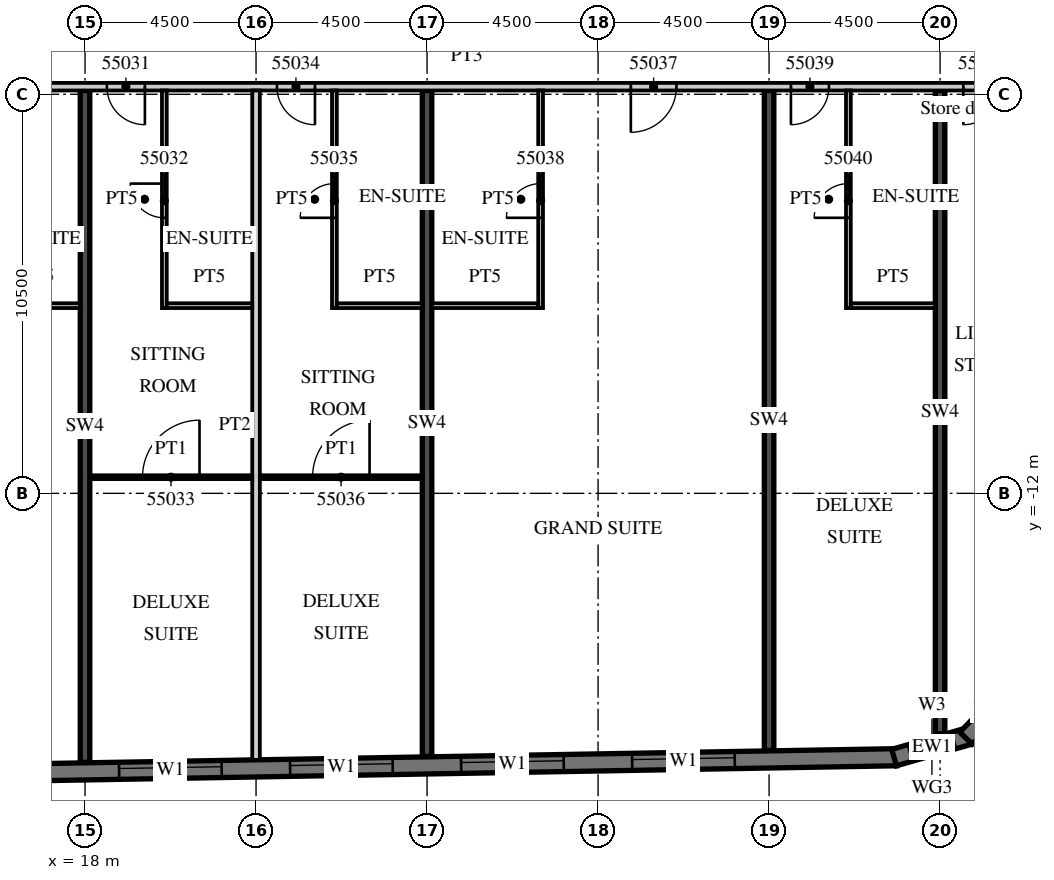
"""IFC4 building model, lengths in metres.
Left out: names, types, materials, properties, quantities, classifications, styles, units other than length and angle.
Written with IfcOpenShell. Run it as: python <this file> out.ifc"""

import sys

from ifc_helpers import new_model, si_unit, direction, frame, frame_2d, origin, place, context, subcontext, project, spatial, polyline, rectangle, outline, extrude, element, fill, save


model = new_model("IFC4")
c1 = context("Model", 3, precision=1e-05, world=origin(), true_north=direction((0.0, 1.0)))
c2 = subcontext(c1, "Body", "Model", "MODEL_VIEW")
j1 = project(units=[si_unit("LENGTHUNIT", "METRE"), si_unit("PLANEANGLEUNIT", "RADIAN")], contexts=[c1])
p1 = place(None, origin())
s1 = spatial("IfcSite", under=j1, at=p1, CompositionType="ELEMENT")
p2 = place(p1, origin())
s2 = spatial("IfcBuilding", under=s1, at=p2, CompositionType="ELEMENT")
p3 = place(p2, frame((0.0, 0.0, 227.6)))
s3 = spatial("IfcBuildingStorey", under=s2, at=p3, CompositionType="ELEMENT", Elevation=227.6)
p4 = place(p3, frame((18.0, -19.079, 0.0), z_axis=(0.0, 0.0, 1.0), x_axis=(0.0, 1.0, 0.0)))
e1 = element("IfcWall", 1, at=p4, inside=s3, PredefinedType="SHEAR", context=c2, shape_type="SweptSolid", body=[
    extrude(rectangle(XDim=17.679, YDim=0.25, at=frame_2d((8.84, 0.0))), origin(), (0.0, 0.0, 1.0), 3.3),
])
p5 = place(p3, frame((27.0, -18.922, 0.0), z_axis=(0.0, 0.0, 1.0), x_axis=(0.0, 1.0, 0.0)))
e2 = element("IfcWall", 2, at=p5, inside=s3, PredefinedType="SHEAR", context=c2, shape_type="SweptSolid", body=[
    extrude(rectangle(XDim=17.522, YDim=0.25, at=frame_2d((8.761, 0.0))), origin(), (0.0, 0.0, 1.0), 3.3),
])
p6 = place(p3, frame((36.0, -18.765, 0.0), z_axis=(0.0, 0.0, 1.0), x_axis=(0.0, 1.0, 0.0)))
e3 = element("IfcWall", 3, at=p6, inside=s3, PredefinedType="SHEAR", context=c2, shape_type="SweptSolid", body=[
    extrude(rectangle(XDim=17.365, YDim=0.25, at=frame_2d((8.683, 0.0))), origin(), (0.0, 0.0, 1.0), 3.3),
])
p7 = place(p3, frame((40.5, -18.325, 0.0), z_axis=(0.0, 0.0, 1.0), x_axis=(0.0, 1.0, 0.0)))
e4 = element("IfcWall", 4, at=p7, inside=s3, PredefinedType="SHEAR", context=c2, shape_type="SweptSolid", body=[
    extrude(rectangle(XDim=16.925, YDim=0.25, at=frame_2d((8.463, 0.0))), origin(), (0.0, 0.0, 1.0), 3.3),
])
p8 = place(p3, frame((-13.504, -19.866, 0.0), z_axis=(0.0, 0.0, 1.0), x_axis=(0.999847672978, 0.017453676992, 0.0)))
e5 = element("IfcWall", 5, at=p8, inside=s3, PredefinedType="SOLIDWALL", context=c2, shape_type="SweptSolid", body=[
    extrude(rectangle(XDim=52.86, YDim=0.45, at=frame_2d((26.43, 0.0))), origin(), (0.0, 0.0, 1.0), 3.02),
])
p9 = place(p8, frame((0.9, 0.0, 0.45)))
e6 = element("IfcOpeningElement", 6, at=p9, cuts=e5, PredefinedType="OPENING", context=c2, shape_type="SweptSolid", body=[
    extrude(rectangle(XDim=2.7, YDim=2.25, at=frame_2d((1.35, 1.125))), frame((0.0, 0.235, 0.0), z_axis=(0.0, -1.0, 0.0), x_axis=(1.0, 0.0, 0.0)), (0.0, 0.0, 1.0), 0.47),
])
p10 = place(p8, frame((5.401, 0.0, 0.45)))
e7 = element("IfcOpeningElement", 7, at=p10, cuts=e5, PredefinedType="OPENING", context=c2, shape_type="SweptSolid", body=[
    extrude(rectangle(XDim=2.7, YDim=2.25, at=frame_2d((1.35, 1.125))), frame((0.0, 0.235, 0.0), z_axis=(0.0, -1.0, 0.0), x_axis=(1.0, 0.0, 0.0)), (0.0, 0.0, 1.0), 0.47),
])
p11 = place(p8, frame((9.902, 0.0, 0.45)))
e8 = element("IfcOpeningElement", 8, at=p11, cuts=e5, PredefinedType="OPENING", context=c2, shape_type="SweptSolid", body=[
    extrude(rectangle(XDim=2.7, YDim=2.25, at=frame_2d((1.35, 1.125))), frame((0.0, 0.235, 0.0), z_axis=(0.0, -1.0, 0.0), x_axis=(1.0, 0.0, 0.0)), (0.0, 0.0, 1.0), 0.47),
])
p12 = place(p8, frame((14.402, 0.0, 0.45)))
e9 = element("IfcOpeningElement", 9, at=p12, cuts=e5, PredefinedType="OPENING", context=c2, shape_type="SweptSolid", body=[
    extrude(rectangle(XDim=2.7, YDim=2.25, at=frame_2d((1.35, 1.125))), frame((0.0, 0.235, 0.0), z_axis=(0.0, -1.0, 0.0), x_axis=(1.0, 0.0, 0.0)), (0.0, 0.0, 1.0), 0.47),
])
p13 = place(p8, frame((18.903, 0.0, 0.45)))
e10 = element("IfcOpeningElement", 10, at=p13, cuts=e5, PredefinedType="OPENING", context=c2, shape_type="SweptSolid", body=[
    extrude(rectangle(XDim=2.7, YDim=2.25, at=frame_2d((1.35, 1.125))), frame((0.0, 0.235, 0.0), z_axis=(0.0, -1.0, 0.0), x_axis=(1.0, 0.0, 0.0)), (0.0, 0.0, 1.0), 0.47),
])
p14 = place(p8, frame((23.404, 0.0, 0.45)))
e11 = element("IfcOpeningElement", 11, at=p14, cuts=e5, PredefinedType="OPENING", context=c2, shape_type="SweptSolid", body=[
    extrude(rectangle(XDim=2.7, YDim=2.25, at=frame_2d((1.35, 1.125))), frame((0.0, 0.235, 0.0), z_axis=(0.0, -1.0, 0.0), x_axis=(1.0, 0.0, 0.0)), (0.0, 0.0, 1.0), 0.47),
])
p15 = place(p8, frame((27.904, 0.0, 0.45)))
e12 = element("IfcOpeningElement", 12, at=p15, cuts=e5, PredefinedType="OPENING", context=c2, shape_type="SweptSolid", body=[
    extrude(rectangle(XDim=2.7, YDim=2.25, at=frame_2d((1.35, 1.125))), frame((0.0, 0.235, 0.0), z_axis=(0.0, -1.0, 0.0), x_axis=(1.0, 0.0, 0.0)), (0.0, 0.0, 1.0), 0.47),
])
p16 = place(p8, frame((32.405, 0.0, 0.45)))
e13 = element("IfcOpeningElement", 13, at=p16, cuts=e5, PredefinedType="OPENING", context=c2, shape_type="SweptSolid", body=[
    extrude(rectangle(XDim=2.7, YDim=2.25, at=frame_2d((1.35, 1.125))), frame((0.0, 0.235, 0.0), z_axis=(0.0, -1.0, 0.0), x_axis=(1.0, 0.0, 0.0)), (0.0, 0.0, 1.0), 0.47),
])
p17 = place(p8, frame((36.906, 0.0, 0.45)))
e14 = element("IfcOpeningElement", 14, at=p17, cuts=e5, PredefinedType="OPENING", context=c2, shape_type="SweptSolid", body=[
    extrude(rectangle(XDim=2.7, YDim=2.25, at=frame_2d((1.35, 1.125))), frame((0.0, 0.235, 0.0), z_axis=(0.0, -1.0, 0.0), x_axis=(1.0, 0.0, 0.0)), (0.0, 0.0, 1.0), 0.47),
])
p18 = place(p8, frame((41.406, 0.0, 0.45)))
e15 = element("IfcOpeningElement", 15, at=p18, cuts=e5, PredefinedType="OPENING", context=c2, shape_type="SweptSolid", body=[
    extrude(rectangle(XDim=2.7, YDim=2.25, at=frame_2d((1.35, 1.125))), frame((0.0, 0.235, 0.0), z_axis=(0.0, -1.0, 0.0), x_axis=(1.0, 0.0, 0.0)), (0.0, 0.0, 1.0), 0.47),
])
p19 = place(p8, frame((45.907, 0.0, 0.45)))
e16 = element("IfcOpeningElement", 16, at=p19, cuts=e5, PredefinedType="OPENING", context=c2, shape_type="SweptSolid", body=[
    extrude(rectangle(XDim=2.7, YDim=2.25, at=frame_2d((1.35, 1.125))), frame((0.0, 0.235, 0.0), z_axis=(0.0, -1.0, 0.0), x_axis=(1.0, 0.0, 0.0)), (0.0, 0.0, 1.0), 0.47),
])
p20 = place(p3, frame((39.29, -18.952, 0.0), z_axis=(0.0, 0.0, 1.0), x_axis=(0.961247584925, 0.275686562016, 0.0)))
e17 = element("IfcWall", 17, at=p20, inside=s3, PredefinedType="SOLIDWALL", context=c2, shape_type="SweptSolid", body=[
    extrude(outline(polyline([(0.0, -0.225), (2.071, -0.225), (1.95, 0.225), (0.121, 0.225), (0.0, -0.225)])), origin(), (0.0, 0.0, 1.0), 3.02),
])
p21 = place(p20, frame((0.435, 0.0, 0.45)))
e18 = element("IfcOpeningElement", 18, at=p21, cuts=e17, PredefinedType="OPENING", context=c2, shape_type="SweptSolid", body=[
    extrude(rectangle(XDim=1.2, YDim=2.25, at=frame_2d((0.6, 1.125))), frame((0.0, 0.235, 0.0), z_axis=(0.0, -1.0, 0.0), x_axis=(1.0, 0.0, 0.0)), (0.0, 0.0, 1.0), 0.47),
])
p22 = place(p3, frame((41.181, -18.442, 0.0), z_axis=(0.0, 0.0, 1.0), x_axis=(0.694678672846, 0.719320193998, 0.0)))
e19 = element("IfcWall", 19, at=p22, inside=s3, PredefinedType="SOLIDWALL", context=c2, shape_type="SweptSolid", body=[
    extrude(outline(polyline([(0.0, -0.225), (2.071, -0.225), (1.95, 0.225), (0.121, 0.225), (0.0, -0.225)])), origin(), (0.0, 0.0, 1.0), 3.02),
])
p23 = place(p3, frame((13.5, -1.3, 0.0), z_axis=(0.0, 0.0, 1.0), x_axis=(1.0, 0.0, 0.0)))
e20 = element("IfcWall", 20, at=p23, inside=s3, PredefinedType="PARTITIONING", context=c2, shape_type="SweptSolid", body=[
    extrude(rectangle(XDim=29.091, YDim=0.2, at=frame_2d((14.545, 0.0))), origin(), (0.0, 0.0, 1.0), 3.02),
])
p24 = place(p23, frame((0.575, 0.0, 0.0)))
e21 = element("IfcOpeningElement", 21, at=p24, cuts=e20, PredefinedType="OPENING", context=c2, shape_type="SweptSolid", body=[
    extrude(rectangle(XDim=1.0, YDim=2.1, at=frame_2d((0.5, 1.05))), frame((0.0, 0.11, 0.0), z_axis=(0.0, -1.0, 0.0), x_axis=(1.0, 0.0, 0.0)), (0.0, 0.0, 1.0), 0.22),
])
p25 = place(p23, frame((5.075, 0.0, 0.0)))
e22 = element("IfcOpeningElement", 22, at=p25, cuts=e20, PredefinedType="OPENING", context=c2, shape_type="SweptSolid", body=[
    extrude(rectangle(XDim=1.0, YDim=2.1, at=frame_2d((0.5, 1.05))), frame((0.0, 0.11, 0.0), z_axis=(0.0, -1.0, 0.0), x_axis=(1.0, 0.0, 0.0)), (0.0, 0.0, 1.0), 0.22),
])
p26 = place(p23, frame((9.55, 0.0, 0.0)))
e23 = element("IfcOpeningElement", 23, at=p26, cuts=e20, PredefinedType="OPENING", context=c2, shape_type="SweptSolid", body=[
    extrude(rectangle(XDim=1.0, YDim=2.1, at=frame_2d((0.5, 1.05))), frame((0.0, 0.11, 0.0), z_axis=(0.0, -1.0, 0.0), x_axis=(1.0, 0.0, 0.0)), (0.0, 0.0, 1.0), 0.22),
])
p27 = place(p23, frame((18.862, 0.0, 0.0)))
e24 = element("IfcOpeningElement", 24, at=p27, cuts=e20, PredefinedType="OPENING", context=c2, shape_type="SweptSolid", body=[
    extrude(rectangle(XDim=1.2, YDim=2.1, at=frame_2d((0.6, 1.05))), frame((0.0, 0.11, 0.0), z_axis=(0.0, -1.0, 0.0), x_axis=(1.0, 0.0, 0.0)), (0.0, 0.0, 1.0), 0.22),
])
p28 = place(p23, frame((23.075, 0.0, 0.0)))
e25 = element("IfcOpeningElement", 25, at=p28, cuts=e20, PredefinedType="OPENING", context=c2, shape_type="SweptSolid", body=[
    extrude(rectangle(XDim=1.0, YDim=2.1, at=frame_2d((0.5, 1.05))), frame((0.0, 0.11, 0.0), z_axis=(0.0, -1.0, 0.0), x_axis=(1.0, 0.0, 0.0)), (0.0, 0.0, 1.0), 0.22),
])
p29 = place(p23, frame((27.611, 0.0, 0.0)))
e26 = element("IfcOpeningElement", 26, at=p29, cuts=e20, PredefinedType="OPENING", context=c2, shape_type="SweptSolid", body=[
    extrude(rectangle(XDim=1.0, YDim=2.4, at=frame_2d((0.5, 1.2))), frame((0.0, 0.11, 0.0), z_axis=(0.0, -1.0, 0.0), x_axis=(1.0, 0.0, 0.0)), (0.0, 0.0, 1.0), 0.22),
])
p30 = place(p3, frame((15.625, -7.062, 0.0), z_axis=(0.0, 0.0, 1.0), x_axis=(1.0, 0.0, 0.0)))
e27 = element("IfcWall", 27, at=p30, inside=s3, PredefinedType="PARTITIONING", context=c2, shape_type="SweptSolid", body=[
    extrude(rectangle(XDim=2.25, YDim=0.125, at=frame_2d((1.125, 0.0))), origin(), (0.0, 0.0, 1.0), 3.02),
])
p31 = place(p3, frame((22.5, -19.013, 0.0), z_axis=(0.0, 0.0, 1.0), x_axis=(0.0, 1.0, 0.0)))
e28 = element("IfcWall", 28, at=p31, inside=s3, PredefinedType="PARTITIONING", context=c2, shape_type="SweptSolid", body=[
    extrude(rectangle(XDim=17.613, YDim=0.2, at=frame_2d((8.807, 0.0))), origin(), (0.0, 0.0, 1.0), 3.02),
])
p32 = place(p3, frame((20.087, -7.125, 0.0), z_axis=(0.0, 0.0, 1.0), x_axis=(0.0, 1.0, 0.0)))
e29 = element("IfcWall", 29, at=p32, inside=s3, PredefinedType="PARTITIONING", context=c2, shape_type="SweptSolid", body=[
    extrude(rectangle(XDim=5.725, YDim=0.125, at=frame_2d((2.863, 0.0))), origin(), (0.0, 0.0, 1.0), 3.02),
])
p33 = place(p32, frame((2.375, 0.0, 0.0)))
e30 = element("IfcOpeningElement", 30, at=p33, cuts=e29, PredefinedType="OPENING", context=c2, shape_type="SweptSolid", body=[
    extrude(rectangle(XDim=0.9, YDim=2.1, at=frame_2d((0.45, 1.05))), frame((0.0, 0.073, 0.0), z_axis=(0.0, -1.0, 0.0), x_axis=(1.0, 0.0, 0.0)), (0.0, 0.0, 1.0), 0.145),
])
p34 = place(p3, frame((20.15, -7.062, 0.0), z_axis=(0.0, 0.0, 1.0), x_axis=(1.0, 0.0, 0.0)))
e31 = element("IfcWall", 31, at=p34, inside=s3, PredefinedType="PARTITIONING", context=c2, shape_type="SweptSolid", body=[
    extrude(rectangle(XDim=2.25, YDim=0.125, at=frame_2d((1.125, 0.0))), origin(), (0.0, 0.0, 1.0), 3.02),
])
p35 = place(p3, frame((18.125, -11.575, 0.0), z_axis=(0.0, 0.0, 1.0), x_axis=(1.0, 0.0, 0.0)))
e32 = element("IfcWall", 32, at=p35, inside=s3, PredefinedType="PARTITIONING", context=c2, shape_type="SweptSolid", body=[
    extrude(rectangle(XDim=4.275, YDim=0.1, at=frame_2d((2.137, 0.0))), origin(), (0.0, 0.0, 1.0), 3.02),
])
p36 = place(p35, frame((1.387, 0.0, 0.0)))
e33 = element("IfcOpeningElement", 33, at=p36, cuts=e32, PredefinedType="OPENING", context=c2, shape_type="SweptSolid", body=[
    extrude(rectangle(XDim=1.5, YDim=2.1, at=frame_2d((0.75, 1.05))), frame((0.0, 0.06, 0.0), z_axis=(0.0, -1.0, 0.0), x_axis=(1.0, 0.0, 0.0)), (0.0, 0.0, 1.0), 0.12),
])
p37 = place(p3, frame((24.562, -7.125, 0.0), z_axis=(0.0, 0.0, 1.0), x_axis=(0.0, 1.0, 0.0)))
e34 = element("IfcWall", 34, at=p37, inside=s3, PredefinedType="PARTITIONING", context=c2, shape_type="SweptSolid", body=[
    extrude(rectangle(XDim=5.725, YDim=0.125, at=frame_2d((2.863, 0.0))), origin(), (0.0, 0.0, 1.0), 3.02),
])
p38 = place(p37, frame((2.375, 0.0, 0.0)))
e35 = element("IfcOpeningElement", 35, at=p38, cuts=e34, PredefinedType="OPENING", context=c2, shape_type="SweptSolid", body=[
    extrude(rectangle(XDim=0.9, YDim=2.1, at=frame_2d((0.45, 1.05))), frame((0.0, 0.073, 0.0), z_axis=(0.0, -1.0, 0.0), x_axis=(1.0, 0.0, 0.0)), (0.0, 0.0, 1.0), 0.145),
])
p39 = place(p3, frame((24.625, -7.062, 0.0), z_axis=(0.0, 0.0, 1.0), x_axis=(1.0, 0.0, 0.0)))
e36 = element("IfcWall", 36, at=p39, inside=s3, PredefinedType="PARTITIONING", context=c2, shape_type="SweptSolid", body=[
    extrude(rectangle(XDim=2.25, YDim=0.125, at=frame_2d((1.125, 0.0))), origin(), (0.0, 0.0, 1.0), 3.02),
])
p40 = place(p3, frame((22.6, -11.575, 0.0), z_axis=(0.0, 0.0, 1.0), x_axis=(1.0, 0.0, 0.0)))
e37 = element("IfcWall", 37, at=p40, inside=s3, PredefinedType="PARTITIONING", context=c2, shape_type="SweptSolid", body=[
    extrude(rectangle(XDim=4.275, YDim=0.1, at=frame_2d((2.137, 0.0))), origin(), (0.0, 0.0, 1.0), 3.02),
])
p41 = place(p40, frame((1.387, 0.0, 0.0)))
e38 = element("IfcOpeningElement", 38, at=p41, cuts=e37, PredefinedType="OPENING", context=c2, shape_type="SweptSolid", body=[
    extrude(rectangle(XDim=1.5, YDim=2.1, at=frame_2d((0.75, 1.05))), frame((0.0, 0.06, 0.0), z_axis=(0.0, -1.0, 0.0), x_axis=(1.0, 0.0, 0.0)), (0.0, 0.0, 1.0), 0.12),
])
p42 = place(p3, frame((29.988, -7.125, 0.0), z_axis=(0.0, 0.0, 1.0), x_axis=(0.0, 1.0, 0.0)))
e39 = element("IfcWall", 39, at=p42, inside=s3, PredefinedType="PARTITIONING", context=c2, shape_type="SweptSolid", body=[
    extrude(rectangle(XDim=5.725, YDim=0.125, at=frame_2d((2.863, 0.0))), origin(), (0.0, 0.0, 1.0), 3.02),
])
p43 = place(p42, frame((2.375, 0.0, 0.0)))
e40 = element("IfcOpeningElement", 40, at=p43, cuts=e39, PredefinedType="OPENING", context=c2, shape_type="SweptSolid", body=[
    extrude(rectangle(XDim=0.9, YDim=2.1, at=frame_2d((0.45, 1.05))), frame((0.0, 0.073, 0.0), z_axis=(0.0, -1.0, 0.0), x_axis=(1.0, 0.0, 0.0)), (0.0, 0.0, 1.0), 0.145),
])
p44 = place(p3, frame((27.125, -7.062, 0.0), z_axis=(0.0, 0.0, 1.0), x_axis=(1.0, 0.0, 0.0)))
e41 = element("IfcWall", 41, at=p44, inside=s3, PredefinedType="PARTITIONING", context=c2, shape_type="SweptSolid", body=[
    extrude(rectangle(XDim=2.8, YDim=0.125, at=frame_2d((1.4, 0.0))), origin(), (0.0, 0.0, 1.0), 3.02),
])
p45 = place(p3, frame((38.087, -7.125, 0.0), z_axis=(0.0, 0.0, 1.0), x_axis=(0.0, 1.0, 0.0)))
e42 = element("IfcWall", 42, at=p45, inside=s3, PredefinedType="PARTITIONING", context=c2, shape_type="SweptSolid", body=[
    extrude(rectangle(XDim=5.725, YDim=0.125, at=frame_2d((2.863, 0.0))), origin(), (0.0, 0.0, 1.0), 3.02),
])
p46 = place(p45, frame((2.375, 0.0, 0.0)))
e43 = element("IfcOpeningElement", 43, at=p46, cuts=e42, PredefinedType="OPENING", context=c2, shape_type="SweptSolid", body=[
    extrude(rectangle(XDim=0.9, YDim=2.1, at=frame_2d((0.45, 1.05))), frame((0.0, 0.073, 0.0), z_axis=(0.0, -1.0, 0.0), x_axis=(1.0, 0.0, 0.0)), (0.0, 0.0, 1.0), 0.145),
])
p47 = place(p3, frame((38.15, -7.062, 0.0), z_axis=(0.0, 0.0, 1.0), x_axis=(1.0, 0.0, 0.0)))
e44 = element("IfcWall", 44, at=p47, inside=s3, PredefinedType="PARTITIONING", context=c2, shape_type="SweptSolid", body=[
    extrude(rectangle(XDim=2.225, YDim=0.125, at=frame_2d((1.113, 0.0))), origin(), (0.0, 0.0, 1.0), 3.02),
])
p48 = place(p16, origin())
e45 = element("IfcWindow", 45, at=p48, inside=s3, PartitioningType="SINGLE_PANEL", PredefinedType="WINDOW", context=c2, shape_type="SweptSolid", body=[
    extrude(rectangle(XDim=2.7, YDim=2.25, at=frame_2d((1.35, 1.125))), frame((0.0, 0.09, 0.0), z_axis=(0.0, -1.0, 0.0), x_axis=(1.0, 0.0, 0.0)), (0.0, 0.0, 1.0), 0.06),
])
fill(e13, e45)
p49 = place(p17, origin())
e46 = element("IfcWindow", 46, at=p49, inside=s3, PartitioningType="SINGLE_PANEL", PredefinedType="WINDOW", context=c2, shape_type="SweptSolid", body=[
    extrude(rectangle(XDim=2.7, YDim=2.25, at=frame_2d((1.35, 1.125))), frame((0.0, 0.09, 0.0), z_axis=(0.0, -1.0, 0.0), x_axis=(1.0, 0.0, 0.0)), (0.0, 0.0, 1.0), 0.06),
])
fill(e14, e46)
p50 = place(p18, origin())
e47 = element("IfcWindow", 47, at=p50, inside=s3, PartitioningType="SINGLE_PANEL", PredefinedType="WINDOW", context=c2, shape_type="SweptSolid", body=[
    extrude(rectangle(XDim=2.7, YDim=2.25, at=frame_2d((1.35, 1.125))), frame((0.0, 0.09, 0.0), z_axis=(0.0, -1.0, 0.0), x_axis=(1.0, 0.0, 0.0)), (0.0, 0.0, 1.0), 0.06),
])
fill(e15, e47)
p51 = place(p19, origin())
e48 = element("IfcWindow", 48, at=p51, inside=s3, PartitioningType="SINGLE_PANEL", PredefinedType="WINDOW", context=c2, shape_type="SweptSolid", body=[
    extrude(rectangle(XDim=2.7, YDim=2.25, at=frame_2d((1.35, 1.125))), frame((0.0, 0.09, 0.0), z_axis=(0.0, -1.0, 0.0), x_axis=(1.0, 0.0, 0.0)), (0.0, 0.0, 1.0), 0.06),
])
fill(e16, e48)
p52 = place(p21, origin())
e49 = element("IfcWindow", 49, at=p52, inside=s3, PartitioningType="SINGLE_PANEL", PredefinedType="WINDOW", context=c2, shape_type="SweptSolid", body=[
    extrude(rectangle(XDim=1.2, YDim=2.25, at=frame_2d((0.6, 1.125))), frame((0.0, 0.09, 0.0), z_axis=(0.0, -1.0, 0.0), x_axis=(1.0, 0.0, 0.0)), (0.0, 0.0, 1.0), 0.06),
])
fill(e18, e49)
p53 = place(p25, origin())
e50 = element("IfcDoor", 50, at=p53, inside=s3, OperationType="SINGLE_SWING_RIGHT", PredefinedType="DOOR", context=c2, shape_type="SweptSolid", body=[
    extrude(rectangle(XDim=1.0, YDim=2.1, at=frame_2d((0.5, 1.05))), frame((0.0, 0.025, 0.0), z_axis=(0.0, -1.0, 0.0), x_axis=(1.0, 0.0, 0.0)), (0.0, 0.0, 1.0), 0.05),
])
fill(e22, e50)
p54 = place(p33, origin())
e51 = element("IfcDoor", 51, at=p54, inside=s3, OperationType="SINGLE_SWING_RIGHT", PredefinedType="DOOR", context=c2, shape_type="SweptSolid", body=[
    extrude(rectangle(XDim=0.9, YDim=2.1, at=frame_2d((0.45, 1.05))), frame((0.0, 0.025, 0.0), z_axis=(0.0, -1.0, 0.0), x_axis=(1.0, 0.0, 0.0)), (0.0, 0.0, 1.0), 0.05),
])
fill(e30, e51)
p55 = place(p36, origin())
e52 = element("IfcDoor", 52, at=p55, inside=s3, OperationType="SINGLE_SWING_RIGHT", PredefinedType="DOOR", context=c2, shape_type="SweptSolid", body=[
    extrude(rectangle(XDim=1.5, YDim=2.1, at=frame_2d((0.75, 1.05))), frame((0.0, 0.025, 0.0), z_axis=(0.0, -1.0, 0.0), x_axis=(1.0, 0.0, 0.0)), (0.0, 0.0, 1.0), 0.05),
])
fill(e33, e52)
p56 = place(p26, origin())
e53 = element("IfcDoor", 53, at=p56, inside=s3, OperationType="SINGLE_SWING_RIGHT", PredefinedType="DOOR", context=c2, shape_type="SweptSolid", body=[
    extrude(rectangle(XDim=1.0, YDim=2.1, at=frame_2d((0.5, 1.05))), frame((0.0, 0.025, 0.0), z_axis=(0.0, -1.0, 0.0), x_axis=(1.0, 0.0, 0.0)), (0.0, 0.0, 1.0), 0.05),
])
fill(e23, e53)
p57 = place(p38, origin())
e54 = element("IfcDoor", 54, at=p57, inside=s3, OperationType="SINGLE_SWING_LEFT", PredefinedType="DOOR", context=c2, shape_type="SweptSolid", body=[
    extrude(rectangle(XDim=0.9, YDim=2.1, at=frame_2d((0.45, 1.05))), frame((0.0, 0.025, 0.0), z_axis=(0.0, -1.0, 0.0), x_axis=(1.0, 0.0, 0.0)), (0.0, 0.0, 1.0), 0.05),
])
fill(e35, e54)
p58 = place(p41, origin())
e55 = element("IfcDoor", 55, at=p58, inside=s3, OperationType="SINGLE_SWING_RIGHT", PredefinedType="DOOR", context=c2, shape_type="SweptSolid", body=[
    extrude(rectangle(XDim=1.5, YDim=2.1, at=frame_2d((0.75, 1.05))), frame((0.0, 0.025, 0.0), z_axis=(0.0, -1.0, 0.0), x_axis=(1.0, 0.0, 0.0)), (0.0, 0.0, 1.0), 0.05),
])
fill(e38, e55)
p59 = place(p27, origin())
e56 = element("IfcDoor", 56, at=p59, inside=s3, OperationType="SINGLE_SWING_LEFT", PredefinedType="DOOR", context=c2, shape_type="SweptSolid", body=[
    extrude(rectangle(XDim=1.2, YDim=2.1, at=frame_2d((0.6, 1.05))), frame((0.0, 0.025, 0.0), z_axis=(0.0, -1.0, 0.0), x_axis=(1.0, 0.0, 0.0)), (0.0, 0.0, 1.0), 0.05),
])
fill(e24, e56)
p60 = place(p43, origin())
e57 = element("IfcDoor", 57, at=p60, inside=s3, OperationType="SINGLE_SWING_LEFT", PredefinedType="DOOR", context=c2, shape_type="SweptSolid", body=[
    extrude(rectangle(XDim=0.9, YDim=2.1, at=frame_2d((0.45, 1.05))), frame((0.0, 0.025, 0.0), z_axis=(0.0, -1.0, 0.0), x_axis=(1.0, 0.0, 0.0)), (0.0, 0.0, 1.0), 0.05),
])
fill(e40, e57)
p61 = place(p28, origin())
e58 = element("IfcDoor", 58, at=p61, inside=s3, OperationType="SINGLE_SWING_LEFT", PredefinedType="DOOR", context=c2, shape_type="SweptSolid", body=[
    extrude(rectangle(XDim=1.0, YDim=2.1, at=frame_2d((0.5, 1.05))), frame((0.0, 0.025, 0.0), z_axis=(0.0, -1.0, 0.0), x_axis=(1.0, 0.0, 0.0)), (0.0, 0.0, 1.0), 0.05),
])
fill(e25, e58)
p62 = place(p46, origin())
e59 = element("IfcDoor", 59, at=p62, inside=s3, OperationType="SINGLE_SWING_LEFT", PredefinedType="DOOR", context=c2, shape_type="SweptSolid", body=[
    extrude(rectangle(XDim=0.9, YDim=2.1, at=frame_2d((0.45, 1.05))), frame((0.0, 0.025, 0.0), z_axis=(0.0, -1.0, 0.0), x_axis=(1.0, 0.0, 0.0)), (0.0, 0.0, 1.0), 0.05),
])
fill(e43, e59)
p63 = place(p29, origin())
e60 = element("IfcDoor", 60, at=p63, inside=s3, OperationType="SINGLE_SWING_LEFT", PredefinedType="DOOR", context=c2, shape_type="SweptSolid", body=[
    extrude(rectangle(XDim=1.0, YDim=2.4, at=frame_2d((0.5, 1.2))), frame((0.0, 0.025, 0.0), z_axis=(0.0, -1.0, 0.0), x_axis=(1.0, 0.0, 0.0)), (0.0, 0.0, 1.0), 0.05),
])
fill(e26, e60)
save(model, sys.argv[1])
